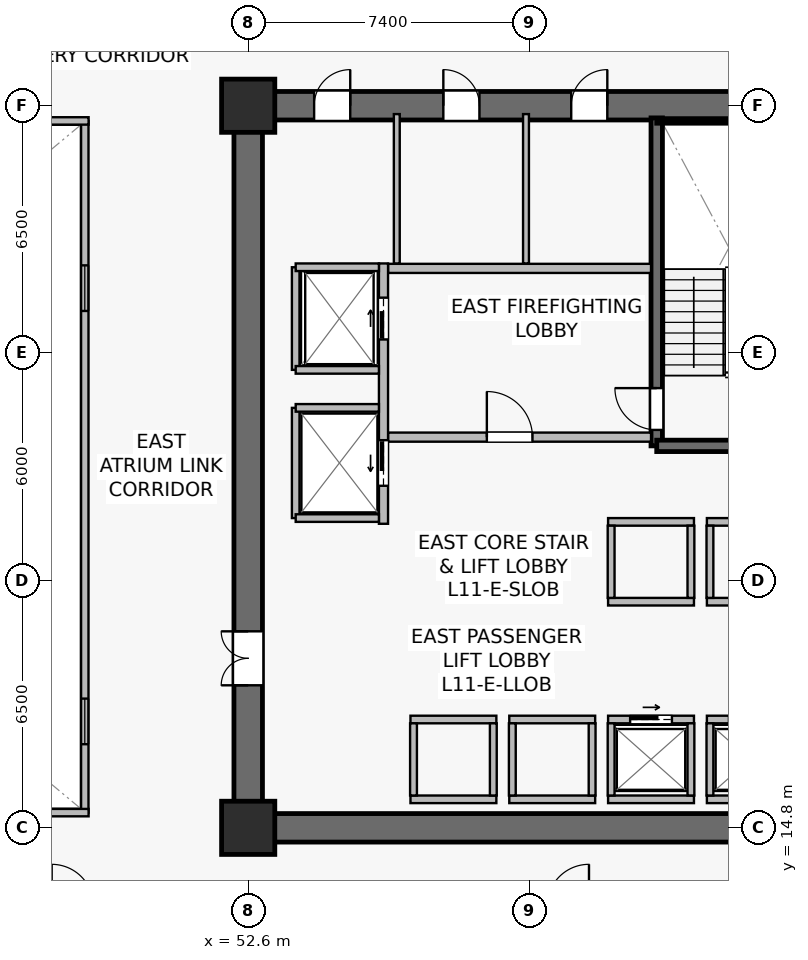
"""IFC4 building model, lengths in metres.
Left out: names, types, materials, properties, quantities, classifications, styles, units other than length and angle.
Written with IfcOpenShell. Run it as: python <this file> out.ifc"""

import sys

from ifc_helpers import new_model, si_unit, direction, frame, frame_2d, origin, origin_2d, place, context, subcontext, project, spatial, rectangle, extrude, source, transform, mapped, element, fill, save


model = new_model("IFC4")
c1 = context("Model", 3, precision=1e-05, world=origin(), true_north=direction((0.0, 1.0)))
c2 = subcontext(c1, "Body", "Model", "MODEL_VIEW")
j1 = project(units=[si_unit("LENGTHUNIT", "METRE"), si_unit("PLANEANGLEUNIT", "RADIAN")], contexts=[c1])
p1 = place(None, origin())
s1 = spatial("IfcSite", under=j1, at=p1, CompositionType="ELEMENT")
p2 = place(p1, origin())
s2 = spatial("IfcBuilding", under=s1, at=p2, CompositionType="ELEMENT")
p3 = place(p2, frame((0.0, 0.0, 45.7)))
s3 = spatial("IfcBuildingStorey", under=s2, at=p3, CompositionType="ELEMENT", Elevation=45.7)
p4 = place(p3, frame((52.225, 14.8, 0.0), z_axis=(0.0, 0.0, 1.0), x_axis=(1.0, 0.0, 0.0)))
e1 = element("IfcWall", 1, at=p4, inside=s3, PredefinedType="SHEAR", context=c2, shape_type="SweptSolid", body=[
    extrude(rectangle(XDim=15.55, YDim=0.75, at=frame_2d((7.775, 0.0))), origin(), (0.0, 0.0, 1.0), 3.78),
])
p5 = place(p3, frame((52.225, 33.8, 0.0), z_axis=(0.0, 0.0, 1.0), x_axis=(1.0, 0.0, 0.0)))
e2 = element("IfcWall", 2, at=p5, inside=s3, PredefinedType="SHEAR", context=c2, shape_type="SweptSolid", body=[
    extrude(rectangle(XDim=15.55, YDim=0.75, at=frame_2d((7.775, 0.0))), origin(), (0.0, 0.0, 1.0), 3.78),
])
p6 = place(p5, frame((8.875, 0.0, 0.0)))
e3 = element("IfcOpeningElement", 3, at=p6, cuts=e2, PredefinedType="OPENING", context=c2, shape_type="SweptSolid", body=[
    extrude(rectangle(XDim=0.95, YDim=2.15, at=frame_2d((0.475, 1.075))), frame((0.0, 0.385, 0.0), z_axis=(0.0, -1.0, 0.0), x_axis=(1.0, 0.0, 0.0)), (0.0, 0.0, 1.0), 0.77),
])
p7 = place(p5, frame((5.51, 0.0, 0.0)))
e4 = element("IfcOpeningElement", 4, at=p7, cuts=e2, PredefinedType="OPENING", context=c2, shape_type="SweptSolid", body=[
    extrude(rectangle(XDim=0.95, YDim=2.15, at=frame_2d((0.475, 1.075))), frame((0.0, 0.385, 0.0), z_axis=(0.0, -1.0, 0.0), x_axis=(1.0, 0.0, 0.0)), (0.0, 0.0, 1.0), 0.77),
])
p8 = place(p5, frame((2.11, 0.0, 0.0)))
e5 = element("IfcOpeningElement", 5, at=p8, cuts=e2, PredefinedType="OPENING", context=c2, shape_type="SweptSolid", body=[
    extrude(rectangle(XDim=0.95, YDim=2.15, at=frame_2d((0.475, 1.075))), frame((0.0, 0.385, 0.0), z_axis=(0.0, -1.0, 0.0), x_axis=(1.0, 0.0, 0.0)), (0.0, 0.0, 1.0), 0.77),
])
p9 = place(p3, frame((52.6, 15.175, 0.0), z_axis=(0.0, 0.0, 1.0), x_axis=(0.0, 1.0, 0.0)))
e6 = element("IfcWall", 6, at=p9, inside=s3, PredefinedType="SHEAR", context=c2, shape_type="SweptSolid", body=[
    extrude(rectangle(XDim=18.25, YDim=0.75, at=frame_2d((9.125, 0.0))), origin(), (0.0, 0.0, 1.0), 3.78),
])
p10 = place(p9, frame((3.375, 0.0, 0.0)))
e7 = element("IfcOpeningElement", 7, at=p10, cuts=e6, PredefinedType="OPENING", context=c2, shape_type="SweptSolid", body=[
    extrude(rectangle(XDim=1.42, YDim=2.2, at=frame_2d((0.71, 1.1))), frame((0.0, 0.385, 0.0), z_axis=(0.0, -1.0, 0.0), x_axis=(1.0, 0.0, 0.0)), (0.0, 0.0, 1.0), 0.77),
])
p11 = place(p3, frame((63.35, 24.85, 0.0), z_axis=(0.0, 0.0, 1.0), x_axis=(0.0, 1.0, 0.0)))
e8 = element("IfcWall", 8, at=p11, inside=s3, PredefinedType="SHEAR", context=c2, shape_type="SweptSolid", body=[
    extrude(rectangle(XDim=8.63, YDim=0.3, at=frame_2d((4.315, 0.0))), origin(), (0.0, 0.0, 1.0), 3.78),
])
p12 = place(p11, frame((0.42, 0.0, 0.0)))
e9 = element("IfcOpeningElement", 9, at=p12, cuts=e8, PredefinedType="OPENING", context=c2, shape_type="SweptSolid", body=[
    extrude(rectangle(XDim=1.1, YDim=2.15, at=frame_2d((0.55, 1.075))), frame((0.0, 0.16, 0.0), z_axis=(0.0, -1.0, 0.0), x_axis=(1.0, 0.0, 0.0)), (0.0, 0.0, 1.0), 0.32),
])
p13 = place(p3, frame((63.35, 24.85, 0.0), z_axis=(0.0, 0.0, 1.0), x_axis=(1.0, 0.0, 0.0)))
e10 = element("IfcWall", 10, at=p13, inside=s3, PredefinedType="SHEAR", context=c2, shape_type="SweptSolid", body=[
    extrude(rectangle(XDim=3.8, YDim=0.3, at=frame_2d((1.9, 0.0))), origin(), (0.0, 0.0, 1.0), 3.78),
])
p14 = place(p3, frame((63.35, 33.4, 0.0), z_axis=(0.0, 0.0, 1.0), x_axis=(1.0, 0.0, 0.0)))
e11 = element("IfcWall", 11, at=p14, inside=s3, PredefinedType="SOLIDWALL", context=c2, shape_type="SweptSolid", body=[
    extrude(rectangle(XDim=3.72, YDim=0.12, at=frame_2d((1.86, 0.0))), origin(), (0.0, 0.0, 1.0), 3.78),
])
m1 = source(origin(), c2, "Body", "SweptSolid", [
    extrude(rectangle(XDim=1.4, YDim=1.4, at=origin_2d()), origin(), (0.0, 0.0, 1.0), 4.1),
])
for number, where, z_axis, x_axis in (
    (12, (52.6, 14.8, 0.0), (0.0, 0.0, 1.0), (1.0, 0.0, 0.0)),
    (13, (52.6, 33.8, 0.0), (0.0, 0.0, 1.0), (1.0, 0.0, 0.0)),
):
    element("IfcColumn", number, at=place(p3, frame(where, z_axis=z_axis, x_axis=x_axis)), inside=s3, PredefinedType="COLUMN", context=c2, shape_type="MappedRepresentation", body=[
        mapped(m1, transform((0.0, 0.0, 0.0), scale=1.0)),
    ])
p15 = place(p3, frame((56.28, 25.08, 0.0), z_axis=(0.0, 0.0, 1.0), x_axis=(1.0, 0.0, 0.0)))
e14 = element("IfcWall", 14, at=p15, inside=s3, PredefinedType="SOLIDWALL", context=c2, shape_type="SweptSolid", body=[
    extrude(rectangle(XDim=6.92, YDim=0.24, at=frame_2d((3.46, 0.0))), origin(), (0.0, 0.0, 1.0), 3.065),
])
p16 = place(p15, frame((2.6, 0.0, 0.0)))
e15 = element("IfcOpeningElement", 15, at=p16, cuts=e14, PredefinedType="OPENING", context=c2, shape_type="SweptSolid", body=[
    extrude(rectangle(XDim=1.2, YDim=2.16, at=frame_2d((0.6, 1.08))), frame((0.0, 0.13, 0.0), z_axis=(0.0, -1.0, 0.0), x_axis=(1.0, 0.0, 0.0)), (0.0, 0.0, 1.0), 0.26),
])
p17 = place(p3, frame((56.28, 29.52, 0.0), z_axis=(0.0, 0.0, 1.0), x_axis=(1.0, 0.0, 0.0)))
e16 = element("IfcWall", 16, at=p17, inside=s3, PredefinedType="SOLIDWALL", context=c2, shape_type="SweptSolid", body=[
    extrude(rectangle(XDim=6.92, YDim=0.24, at=frame_2d((3.46, 0.0))), origin(), (0.0, 0.0, 1.0), 3.065),
])
p18 = place(p3, frame((56.16, 22.8, 0.0), z_axis=(0.0, 0.0, 1.0), x_axis=(0.0, 1.0, 0.0)))
e17 = element("IfcWall", 17, at=p18, inside=s3, PredefinedType="SOLIDWALL", context=c2, shape_type="SweptSolid", body=[
    extrude(rectangle(XDim=6.85, YDim=0.24, at=frame_2d((3.425, 0.0))), origin(), (0.0, 0.0, 1.0), 2.865),
])
p19 = place(p18, frame((4.85, 0.0, 0.0)))
e18 = element("IfcOpeningElement", 18, at=p19, cuts=e17, PredefinedType="OPENING", context=c2, shape_type="SweptSolid", body=[
    extrude(rectangle(XDim=1.1, YDim=2.22, at=frame_2d((0.55, 1.11))), frame((0.0, 0.13, 0.0), z_axis=(0.0, -1.0, 0.0), x_axis=(1.0, 0.0, 0.0)), (0.0, 0.0, 1.0), 0.26),
])
p20 = place(p18, frame((1.0, 0.0, 0.0)))
e19 = element("IfcOpeningElement", 19, at=p20, cuts=e17, PredefinedType="OPENING", context=c2, shape_type="SweptSolid", body=[
    extrude(rectangle(XDim=1.2, YDim=2.22, at=frame_2d((0.6, 1.11))), frame((0.0, 0.13, 0.0), z_axis=(0.0, -1.0, 0.0), x_axis=(1.0, 0.0, 0.0)), (0.0, 0.0, 1.0), 0.26),
])
p21 = place(p3, frame((64.67, 17.65, 0.0), z_axis=(0.0, 0.0, 1.0), x_axis=(1.0, 0.0, 0.0)))
e20 = element("IfcWall", 20, at=p21, inside=s3, PredefinedType="SOLIDWALL", context=c2, shape_type="SweptSolid", body=[
    extrude(rectangle(XDim=2.26, YDim=0.2, at=frame_2d((1.13, 0.0))), origin(), (0.0, 0.0, 1.0), 3.78),
])
p22 = place(p21, frame((0.58, 0.0, 0.0)))
e21 = element("IfcOpeningElement", 21, at=p22, cuts=e20, PredefinedType="OPENING", context=c2, shape_type="SweptSolid", body=[
    extrude(rectangle(XDim=1.1, YDim=2.22, at=frame_2d((0.55, 1.11))), frame((0.0, 0.11, 0.0), z_axis=(0.0, -1.0, 0.0), x_axis=(1.0, 0.0, 0.0)), (0.0, 0.0, 1.0), 0.22),
])
p23 = place(p3, frame((64.67, 15.55, 0.0), z_axis=(0.0, 0.0, 1.0), x_axis=(1.0, 0.0, 0.0)))
e22 = element("IfcWall", 22, at=p23, inside=s3, PredefinedType="SOLIDWALL", context=c2, shape_type="SweptSolid", body=[
    extrude(rectangle(XDim=2.26, YDim=0.2, at=frame_2d((1.13, 0.0))), origin(), (0.0, 0.0, 1.0), 3.78),
])
p24 = place(p3, frame((64.75, 15.65, 0.0), z_axis=(0.0, 0.0, 1.0), x_axis=(0.0, 1.0, 0.0)))
e23 = element("IfcWall", 23, at=p24, inside=s3, PredefinedType="SOLIDWALL", context=c2, shape_type="SweptSolid", body=[
    extrude(rectangle(XDim=1.9, YDim=0.18, at=frame_2d((0.95, 0.0))), origin(), (0.0, 0.0, 1.0), 3.78),
])
p25 = place(p3, frame((62.07, 17.65, 0.0), z_axis=(0.0, 0.0, 1.0), x_axis=(1.0, 0.0, 0.0)))
e24 = element("IfcWall", 24, at=p25, inside=s3, PredefinedType="SOLIDWALL", context=c2, shape_type="SweptSolid", body=[
    extrude(rectangle(XDim=2.26, YDim=0.2, at=frame_2d((1.13, 0.0))), origin(), (0.0, 0.0, 1.0), 3.78),
])
p26 = place(p25, frame((0.58, 0.0, 0.0)))
e25 = element("IfcOpeningElement", 25, at=p26, cuts=e24, PredefinedType="OPENING", context=c2, shape_type="SweptSolid", body=[
    extrude(rectangle(XDim=1.1, YDim=2.22, at=frame_2d((0.55, 1.11))), frame((0.0, 0.11, 0.0), z_axis=(0.0, -1.0, 0.0), x_axis=(1.0, 0.0, 0.0)), (0.0, 0.0, 1.0), 0.22),
])
p27 = place(p3, frame((62.07, 15.55, 0.0), z_axis=(0.0, 0.0, 1.0), x_axis=(1.0, 0.0, 0.0)))
e26 = element("IfcWall", 26, at=p27, inside=s3, PredefinedType="SOLIDWALL", context=c2, shape_type="SweptSolid", body=[
    extrude(rectangle(XDim=2.26, YDim=0.2, at=frame_2d((1.13, 0.0))), origin(), (0.0, 0.0, 1.0), 3.78),
])
for number, where, z_axis, x_axis in (
    (27, (62.15, 15.65, 0.0), (0.0, 0.0, 1.0), (0.0, 1.0, 0.0)),
    (28, (64.25, 15.65, 0.0), (0.0, 0.0, 1.0), (0.0, 1.0, 0.0)),
):
    element("IfcWall", number, at=place(p3, frame(where, z_axis=z_axis, x_axis=x_axis)), inside=s3, PredefinedType="SOLIDWALL", context=c2, shape_type="SweptSolid", body=[
        extrude(rectangle(XDim=1.9, YDim=0.18, at=frame_2d((0.95, 0.0))), origin(), (0.0, 0.0, 1.0), 3.78),
    ])
for number, where, z_axis, x_axis in (
    (29, (59.47, 17.65, 0.0), (0.0, 0.0, 1.0), (1.0, 0.0, 0.0)),
    (30, (59.47, 15.55, 0.0), (0.0, 0.0, 1.0), (1.0, 0.0, 0.0)),
):
    element("IfcWall", number, at=place(p3, frame(where, z_axis=z_axis, x_axis=x_axis)), inside=s3, PredefinedType="SOLIDWALL", context=c2, shape_type="SweptSolid", body=[
        extrude(rectangle(XDim=2.26, YDim=0.2, at=frame_2d((1.13, 0.0))), origin(), (0.0, 0.0, 1.0), 3.065),
    ])
for number, where, z_axis, x_axis in (
    (31, (59.55, 15.65, 0.0), (0.0, 0.0, 1.0), (0.0, 1.0, 0.0)),
    (32, (61.65, 15.65, 0.0), (0.0, 0.0, 1.0), (0.0, 1.0, 0.0)),
):
    element("IfcWall", number, at=place(p3, frame(where, z_axis=z_axis, x_axis=x_axis)), inside=s3, PredefinedType="SOLIDWALL", context=c2, shape_type="SweptSolid", body=[
        extrude(rectangle(XDim=1.9, YDim=0.18, at=frame_2d((0.95, 0.0))), origin(), (0.0, 0.0, 1.0), 3.78),
    ])
for number, where, z_axis, x_axis in (
    (33, (56.87, 17.65, 0.0), (0.0, 0.0, 1.0), (1.0, 0.0, 0.0)),
    (34, (56.87, 15.55, 0.0), (0.0, 0.0, 1.0), (1.0, 0.0, 0.0)),
):
    element("IfcWall", number, at=place(p3, frame(where, z_axis=z_axis, x_axis=x_axis)), inside=s3, PredefinedType="SOLIDWALL", context=c2, shape_type="SweptSolid", body=[
        extrude(rectangle(XDim=2.26, YDim=0.2, at=frame_2d((1.13, 0.0))), origin(), (0.0, 0.0, 1.0), 3.78),
    ])
for number, where, z_axis, x_axis in (
    (35, (56.95, 15.65, 0.0), (0.0, 0.0, 1.0), (0.0, 1.0, 0.0)),
    (36, (59.05, 15.65, 0.0), (0.0, 0.0, 1.0), (0.0, 1.0, 0.0)),
):
    element("IfcWall", number, at=place(p3, frame(where, z_axis=z_axis, x_axis=x_axis)), inside=s3, PredefinedType="SOLIDWALL", context=c2, shape_type="SweptSolid", body=[
        extrude(rectangle(XDim=1.9, YDim=0.18, at=frame_2d((0.95, 0.0))), origin(), (0.0, 0.0, 1.0), 3.78),
    ])
for number, where, z_axis, x_axis in (
    (37, (64.67, 20.75, 0.0), (0.0, 0.0, 1.0), (1.0, 0.0, 0.0)),
    (38, (64.67, 22.85, 0.0), (0.0, 0.0, 1.0), (1.0, 0.0, 0.0)),
):
    element("IfcWall", number, at=place(p3, frame(where, z_axis=z_axis, x_axis=x_axis)), inside=s3, PredefinedType="SOLIDWALL", context=c2, shape_type="SweptSolid", body=[
        extrude(rectangle(XDim=2.26, YDim=0.2, at=frame_2d((1.13, 0.0))), origin(), (0.0, 0.0, 1.0), 3.78),
    ])
p28 = place(p3, frame((64.75, 20.85, 0.0), z_axis=(0.0, 0.0, 1.0), x_axis=(0.0, 1.0, 0.0)))
e39 = element("IfcWall", 39, at=p28, inside=s3, PredefinedType="SOLIDWALL", context=c2, shape_type="SweptSolid", body=[
    extrude(rectangle(XDim=1.9, YDim=0.18, at=frame_2d((0.95, 0.0))), origin(), (0.0, 0.0, 1.0), 3.78),
])
for number, where, z_axis, x_axis in (
    (40, (62.07, 20.75, 0.0), (0.0, 0.0, 1.0), (1.0, 0.0, 0.0)),
    (41, (62.07, 22.85, 0.0), (0.0, 0.0, 1.0), (1.0, 0.0, 0.0)),
):
    element("IfcWall", number, at=place(p3, frame(where, z_axis=z_axis, x_axis=x_axis)), inside=s3, PredefinedType="SOLIDWALL", context=c2, shape_type="SweptSolid", body=[
        extrude(rectangle(XDim=2.26, YDim=0.2, at=frame_2d((1.13, 0.0))), origin(), (0.0, 0.0, 1.0), 3.78),
    ])
for number, where, z_axis, x_axis in (
    (42, (62.15, 20.85, 0.0), (0.0, 0.0, 1.0), (0.0, 1.0, 0.0)),
    (43, (64.25, 20.85, 0.0), (0.0, 0.0, 1.0), (0.0, 1.0, 0.0)),
):
    element("IfcWall", number, at=place(p3, frame(where, z_axis=z_axis, x_axis=x_axis)), inside=s3, PredefinedType="SOLIDWALL", context=c2, shape_type="SweptSolid", body=[
        extrude(rectangle(XDim=1.9, YDim=0.18, at=frame_2d((0.95, 0.0))), origin(), (0.0, 0.0, 1.0), 3.78),
    ])
p29 = place(p3, frame((53.85, 26.85, 0.0), z_axis=(0.0, 0.0, 1.0), x_axis=(0.0, 1.0, 0.0)))
e44 = element("IfcWall", 44, at=p29, inside=s3, PredefinedType="SOLIDWALL", context=c2, shape_type="SweptSolid", body=[
    extrude(rectangle(XDim=2.7, YDim=0.2, at=frame_2d((1.35, 0.0))), origin(), (0.0, 0.0, 1.0), 3.78),
])
p30 = place(p3, frame((53.85, 29.55, 0.0), z_axis=(0.0, 0.0, 1.0), x_axis=(1.0, 0.0, 0.0)))
e45 = element("IfcWall", 45, at=p30, inside=s3, PredefinedType="SOLIDWALL", context=c2, shape_type="SweptSolid", body=[
    extrude(rectangle(XDim=2.19, YDim=0.2, at=frame_2d((1.095, 0.0))), origin(), (0.0, 0.0, 1.0), 3.78),
])
p31 = place(p3, frame((53.85, 26.85, 0.0), z_axis=(0.0, 0.0, 1.0), x_axis=(1.0, 0.0, 0.0)))
e46 = element("IfcWall", 46, at=p31, inside=s3, PredefinedType="SOLIDWALL", context=c2, shape_type="SweptSolid", body=[
    extrude(rectangle(XDim=2.19, YDim=0.2, at=frame_2d((1.095, 0.0))), origin(), (0.0, 0.0, 1.0), 3.177),
])
p32 = place(p3, frame((53.85, 22.95, 0.0), z_axis=(0.0, 0.0, 1.0), x_axis=(0.0, 1.0, 0.0)))
e47 = element("IfcWall", 47, at=p32, inside=s3, PredefinedType="SOLIDWALL", context=c2, shape_type="SweptSolid", body=[
    extrude(rectangle(XDim=2.9, YDim=0.2, at=frame_2d((1.45, 0.0))), origin(), (0.0, 0.0, 1.0), 2.865),
])
for number, where, z_axis, x_axis in (
    (48, (53.85, 25.85, 0.0), (0.0, 0.0, 1.0), (1.0, 0.0, 0.0)),
    (49, (53.85, 22.95, 0.0), (0.0, 0.0, 1.0), (1.0, 0.0, 0.0)),
):
    element("IfcWall", number, at=place(p3, frame(where, z_axis=z_axis, x_axis=x_axis)), inside=s3, PredefinedType="SOLIDWALL", context=c2, shape_type="SweptSolid", body=[
        extrude(rectangle(XDim=2.19, YDim=0.2, at=frame_2d((1.095, 0.0))), origin(), (0.0, 0.0, 1.0), 3.78),
    ])
p33 = place(p3, frame((59.91, 29.65, 0.0), z_axis=(0.0, 0.0, 1.0), x_axis=(0.0, 1.0, 0.0)))
e50 = element("IfcWall", 50, at=p33, inside=s3, PredefinedType="PLUMBINGWALL", context=c2, shape_type="SweptSolid", body=[
    extrude(rectangle(XDim=3.93, YDim=0.155, at=frame_2d((1.965, 0.0))), origin(), (0.0, 0.0, 1.0), 3.065),
])
p34 = place(p3, frame((56.51, 29.65, 0.0), z_axis=(0.0, 0.0, 1.0), x_axis=(0.0, 1.0, 0.0)))
e51 = element("IfcWall", 51, at=p34, inside=s3, PredefinedType="PLUMBINGWALL", context=c2, shape_type="SweptSolid", body=[
    extrude(rectangle(XDim=3.93, YDim=0.155, at=frame_2d((1.965, 0.0))), origin(), (0.0, 0.0, 1.0), 3.78),
])
p35 = place(p3, frame((48.3, 15.2, 0.0), z_axis=(0.0, 0.0, 1.0), x_axis=(0.0, 1.0, 0.0)))
e52 = element("IfcWall", 52, at=p35, inside=s3, PredefinedType="SOLIDWALL", context=c2, shape_type="SweptSolid", body=[
    extrude(rectangle(XDim=18.2, YDim=0.195, at=frame_2d((9.1, 0.0))), origin(), (0.0, 0.0, 1.0), 3.78),
])
p36 = place(p35, frame((1.8, 0.0, 0.9)))
e53 = element("IfcOpeningElement", 53, at=p36, cuts=e52, PredefinedType="OPENING", context=c2, shape_type="SweptSolid", body=[
    extrude(rectangle(XDim=1.2, YDim=1.35, at=frame_2d((0.6, 0.675))), frame((0.0, 0.107, 0.0), z_axis=(0.0, -1.0, 0.0), x_axis=(1.0, 0.0, 0.0)), (0.0, 0.0, 1.0), 0.215),
])
p37 = place(p35, frame((13.2, 0.0, 0.9)))
e54 = element("IfcOpeningElement", 54, at=p37, cuts=e52, PredefinedType="OPENING", context=c2, shape_type="SweptSolid", body=[
    extrude(rectangle(XDim=1.2, YDim=1.35, at=frame_2d((0.6, 0.675))), frame((0.0, 0.107, 0.0), z_axis=(0.0, -1.0, 0.0), x_axis=(1.0, 0.0, 0.0)), (0.0, 0.0, 1.0), 0.215),
])
for number, where, z_axis, x_axis in (
    (55, (26.4, 15.2, 0.0), (0.0, 0.0, 1.0), (1.0, 0.0, 0.0)),
    (56, (26.4, 33.4, 0.0), (0.0, 0.0, 1.0), (1.0, 0.0, 0.0)),
):
    element("IfcWall", number, at=place(p3, frame(where, z_axis=z_axis, x_axis=x_axis)), inside=s3, PredefinedType="SOLIDWALL", context=c2, shape_type="SweptSolid", body=[
        extrude(rectangle(XDim=22.0, YDim=0.195, at=frame_2d((11.0, 0.0))), origin(), (0.0, 0.0, 1.0), 3.78),
    ])
m2 = source(origin(), c2, "Body", "SweptSolid", [
    extrude(rectangle(XDim=1.2, YDim=1.35, at=frame_2d((0.6, 0.675))), frame((0.0, 0.03, 0.0), z_axis=(0.0, -1.0, 0.0), x_axis=(1.0, 0.0, 0.0)), (0.0, 0.0, 1.0), 0.06),
])
p38 = place(p36, origin())
e57 = element("IfcWindow", 57, at=p38, inside=s3, PartitioningType="SINGLE_PANEL", PredefinedType="WINDOW", context=c2, shape_type="MappedRepresentation", body=[
    mapped(m2, transform((0.0, 0.0, 0.0), scale=1.0)),
])
fill(e53, e57)
p39 = place(p37, origin())
e58 = element("IfcWindow", 58, at=p39, inside=s3, PartitioningType="SINGLE_PANEL", PredefinedType="WINDOW", context=c2, shape_type="MappedRepresentation", body=[
    mapped(m2, transform((0.0, 0.0, 0.0), scale=1.0)),
])
fill(e54, e58)
m3 = source(origin(), c2, "Body", "SweptSolid", [
    extrude(rectangle(XDim=1.1, YDim=2.15, at=frame_2d((0.55, 1.075))), frame((0.0, 0.025, 0.0), z_axis=(0.0, -1.0, 0.0), x_axis=(1.0, 0.0, 0.0)), (0.0, 0.0, 1.0), 0.05),
])
p40 = place(p12, origin())
e59 = element("IfcDoor", 59, at=p40, inside=s3, OperationType="SINGLE_SWING_RIGHT", PredefinedType="DOOR", context=c2, shape_type="MappedRepresentation", body=[
    mapped(m3, transform((0.0, 0.0, 0.0), scale=1.0)),
])
fill(e9, e59)
m4 = source(origin(), c2, "Body", "SweptSolid", [
    extrude(rectangle(XDim=1.2, YDim=2.16, at=frame_2d((0.6, 1.08))), frame((0.0, 0.025, 0.0), z_axis=(0.0, -1.0, 0.0), x_axis=(1.0, 0.0, 0.0)), (0.0, 0.0, 1.0), 0.05),
])
p41 = place(p16, origin())
e60 = element("IfcDoor", 60, at=p41, inside=s3, OperationType="SINGLE_SWING_LEFT", PredefinedType="DOOR", context=c2, shape_type="MappedRepresentation", body=[
    mapped(m4, transform((0.0, 0.0, 0.0), scale=1.0)),
])
fill(e15, e60)
m5 = source(origin(), c2, "Body", "SweptSolid", [
    extrude(rectangle(XDim=1.1, YDim=2.22, at=frame_2d((0.55, 1.11))), frame((0.0, 0.025, 0.0), z_axis=(0.0, -1.0, 0.0), x_axis=(1.0, 0.0, 0.0)), (0.0, 0.0, 1.0), 0.05),
])
p42 = place(p26, origin())
e61 = element("IfcDoor", 61, at=p42, inside=s3, OperationType="SLIDING_TO_RIGHT", PredefinedType="USERDEFINED", context=c2, shape_type="MappedRepresentation", body=[
    mapped(m5, transform((0.0, 0.0, 0.0), scale=1.0)),
])
fill(e25, e61)
p43 = place(p19, origin())
e62 = element("IfcDoor", 62, at=p43, inside=s3, OperationType="SLIDING_TO_RIGHT", PredefinedType="USERDEFINED", context=c2, shape_type="MappedRepresentation", body=[
    mapped(m5, transform((0.0, 0.0, 0.0), scale=1.0)),
])
fill(e18, e62)
m6 = source(origin(), c2, "Body", "SweptSolid", [
    extrude(rectangle(XDim=1.2, YDim=2.22, at=frame_2d((0.6, 1.11))), frame((0.0, 0.025, 0.0), z_axis=(0.0, -1.0, 0.0), x_axis=(1.0, 0.0, 0.0)), (0.0, 0.0, 1.0), 0.05),
])
p44 = place(p20, origin())
e63 = element("IfcDoor", 63, at=p44, inside=s3, OperationType="SLIDING_TO_LEFT", PredefinedType="USERDEFINED", context=c2, shape_type="MappedRepresentation", body=[
    mapped(m6, transform((0.0, 0.0, 0.0), scale=1.0)),
])
fill(e19, e63)
m7 = source(origin(), c2, "Body", "SweptSolid", [
    extrude(rectangle(XDim=1.42, YDim=2.2, at=frame_2d((0.71, 1.1))), frame((0.0, 0.025, 0.0), z_axis=(0.0, -1.0, 0.0), x_axis=(1.0, 0.0, 0.0)), (0.0, 0.0, 1.0), 0.05),
])
p45 = place(p10, origin())
e64 = element("IfcDoor", 64, at=p45, inside=s3, OperationType="DOUBLE_DOOR_SINGLE_SWING", PredefinedType="DOOR", context=c2, shape_type="MappedRepresentation", body=[
    mapped(m7, transform((0.0, 0.0, 0.0), scale=1.0)),
])
fill(e7, e64)
m8 = source(origin(), c2, "Body", "SweptSolid", [
    extrude(rectangle(XDim=0.95, YDim=2.15, at=frame_2d((0.475, 1.075))), frame((0.0, 0.025, 0.0), z_axis=(0.0, -1.0, 0.0), x_axis=(1.0, 0.0, 0.0)), (0.0, 0.0, 1.0), 0.05),
])
p46 = place(p6, origin())
e65 = element("IfcDoor", 65, at=p46, inside=s3, OperationType="SINGLE_SWING_RIGHT", PredefinedType="DOOR", context=c2, shape_type="MappedRepresentation", body=[
    mapped(m8, transform((0.0, 0.0, 0.0), scale=1.0)),
])
fill(e3, e65)
p47 = place(p7, origin())
e66 = element("IfcDoor", 66, at=p47, inside=s3, OperationType="SINGLE_SWING_LEFT", PredefinedType="DOOR", context=c2, shape_type="MappedRepresentation", body=[
    mapped(m8, transform((0.0, 0.0, 0.0), scale=1.0)),
])
fill(e4, e66)
p48 = place(p8, origin())
e67 = element("IfcDoor", 67, at=p48, inside=s3, OperationType="SINGLE_SWING_RIGHT", PredefinedType="DOOR", context=c2, shape_type="MappedRepresentation", body=[
    mapped(m8, transform((0.0, 0.0, 0.0), scale=1.0)),
])
fill(e5, e67)
save(model, sys.argv[1])
